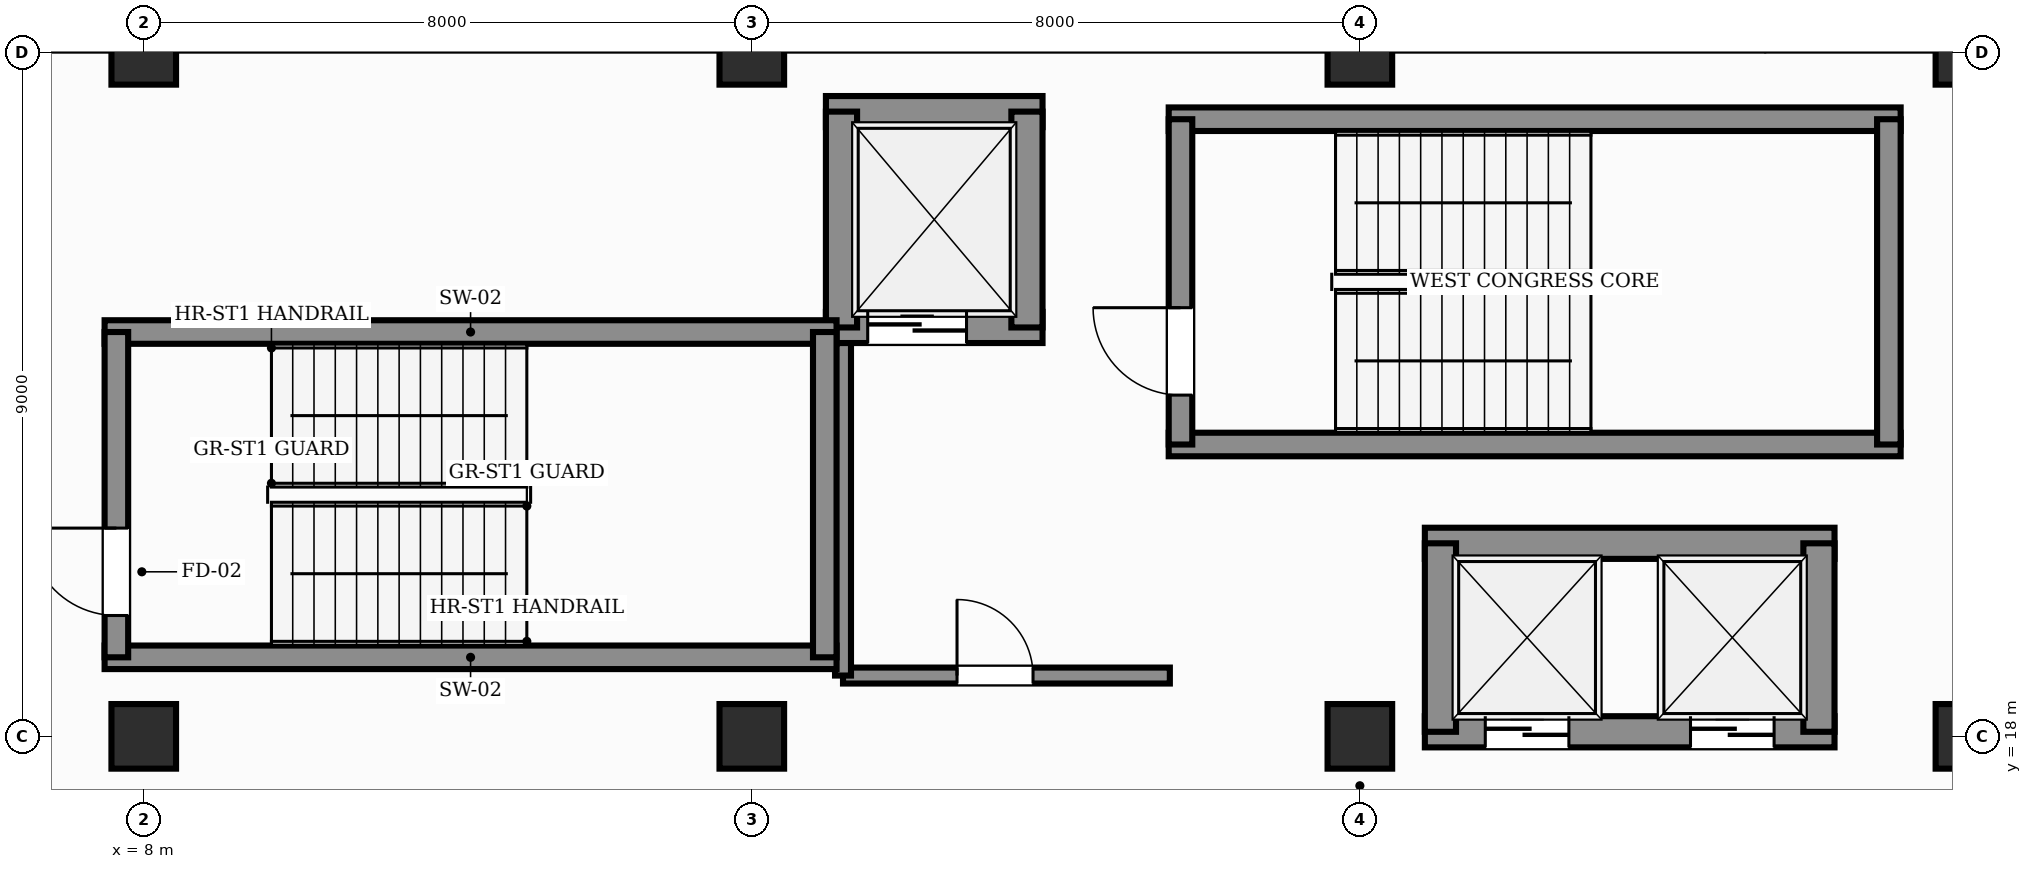
"""IFC4 building model, lengths in metres.
Left out: names, types, materials, properties, quantities, classifications, styles, units other than length and angle.
Written with IfcOpenShell. Run it as: python <this file> out.ifc"""

import sys

from ifc_helpers import new_model, si_unit, direction, frame, frame_2d, origin, origin_2d, place, context, subcontext, project, spatial, rectangle, extrude, element, fill, save


model = new_model("IFC4")
c1 = context("Model", 3, precision=1e-05, world=origin(), true_north=direction((0.0, 1.0)))
c2 = subcontext(c1, "Body", "Model", "MODEL_VIEW")
j1 = project(units=[si_unit("LENGTHUNIT", "METRE"), si_unit("PLANEANGLEUNIT", "RADIAN")], contexts=[c1])
p1 = place(None, origin())
s1 = spatial("IfcSite", under=j1, at=p1, CompositionType="ELEMENT")
p2 = place(p1, origin())
s2 = spatial("IfcBuilding", under=s1, at=p2, CompositionType="ELEMENT")
p3 = place(p2, frame((0.0, 0.0, -4.8)))
s3 = spatial("IfcBuildingStorey", under=s2, at=p3, CompositionType="ELEMENT", Elevation=-4.8)
for number, where, z_axis, x_axis in (
    (1, (8.0, 18.0, 0.0), (0.0, 0.0, 1.0), (1.0, 0.0, 0.0)),
    (2, (8.0, 27.0, 0.0), (0.0, 0.0, 1.0), (1.0, 0.0, 0.0)),
    (3, (16.0, 18.0, 0.0), (0.0, 0.0, 1.0), (1.0, 0.0, 0.0)),
    (4, (16.0, 27.0, 0.0), (0.0, 0.0, 1.0), (1.0, 0.0, 0.0)),
    (5, (24.0, 18.0, 0.0), (0.0, 0.0, 1.0), (1.0, 0.0, 0.0)),
    (6, (24.0, 27.0, 0.0), (0.0, 0.0, 1.0), (1.0, 0.0, 0.0)),
    (7, (32.0, 18.0, 0.0), (0.0, 0.0, 1.0), (1.0, 0.0, 0.0)),
    (8, (32.0, 27.0, 0.0), (0.0, 0.0, 1.0), (1.0, 0.0, 0.0)),
):
    element("IfcColumn", number, at=place(p3, frame(where, z_axis=z_axis, x_axis=x_axis)), inside=s3, PredefinedType="COLUMN", context=c2, shape_type="SweptSolid", body=[
        extrude(rectangle(XDim=0.85, YDim=0.85, at=origin_2d()), origin(), (0.0, 0.0, 1.0), 4.8),
    ])
for number, where, z_axis, x_axis in (
    (9, (21.485, 21.84, 0.0), (0.0, 0.0, 1.0), (1.0, 0.0, 0.0)),
    (10, (21.485, 26.12, 0.0), (0.0, 0.0, 1.0), (1.0, 0.0, 0.0)),
):
    element("IfcWall", number, at=place(p3, frame(where, z_axis=z_axis, x_axis=x_axis)), inside=s3, PredefinedType="SHEAR", context=c2, shape_type="SweptSolid", body=[
        extrude(rectangle(XDim=9.63, YDim=0.31, at=frame_2d((4.815, 0.0))), origin(), (0.0, 0.0, 1.0), 4.8),
    ])
p4 = place(p3, frame((21.64, 21.84, 0.0), z_axis=(0.0, 0.0, 1.0), x_axis=(0.0, 1.0, 0.0)))
e11 = element("IfcWall", 11, at=p4, inside=s3, PredefinedType="SHEAR", context=c2, shape_type="SweptSolid", body=[
    extrude(rectangle(XDim=4.28, YDim=0.31, at=frame_2d((2.14, 0.0))), origin(), (0.0, 0.0, 1.0), 4.8),
])
p5 = place(p4, frame((0.65, 0.0, 0.0)))
e12 = element("IfcOpeningElement", 12, at=p5, cuts=e11, PredefinedType="OPENING", context=c2, shape_type="SweptSolid", body=[
    extrude(rectangle(XDim=1.15, YDim=2.2, at=frame_2d((0.575, 1.1))), frame((0.0, 0.165, 0.0), z_axis=(0.0, -1.0, 0.0), x_axis=(1.0, 0.0, 0.0)), (0.0, 0.0, 1.0), 0.33),
])
p6 = place(p3, frame((30.96, 21.84, 0.0), z_axis=(0.0, 0.0, 1.0), x_axis=(0.0, 1.0, 0.0)))
e13 = element("IfcWall", 13, at=p6, inside=s3, PredefinedType="SHEAR", context=c2, shape_type="SweptSolid", body=[
    extrude(rectangle(XDim=4.28, YDim=0.31, at=frame_2d((2.14, 0.0))), origin(), (0.0, 0.0, 1.0), 4.8),
])
p7 = place(p3, frame((17.2, 18.8, 0.0), z_axis=(0.0, 0.0, 1.0), x_axis=(1.0, 0.0, 0.0)))
e14 = element("IfcWall", 14, at=p7, inside=s3, PredefinedType="PARTITIONING", context=c2, shape_type="SweptSolid", body=[
    extrude(rectangle(XDim=4.3, YDim=0.21, at=frame_2d((2.15, 0.0))), origin(), (0.0, 0.0, 1.0), 3.25),
])
p8 = place(p7, frame((1.5, 0.0, 0.0)))
e15 = element("IfcOpeningElement", 15, at=p8, cuts=e14, PredefinedType="OPENING", context=c2, shape_type="SweptSolid", body=[
    extrude(rectangle(XDim=1.0, YDim=2.15, at=frame_2d((0.5, 1.075))), frame((0.0, 0.115, 0.0), z_axis=(0.0, -1.0, 0.0), x_axis=(1.0, 0.0, 0.0)), (0.0, 0.0, 1.0), 0.23),
])
p9 = place(p3, frame((17.2, 18.8, 0.0), z_axis=(0.0, 0.0, 1.0), x_axis=(0.0, 1.0, 0.0)))
e16 = element("IfcWall", 16, at=p9, inside=s3, PredefinedType="PARTITIONING", context=c2, shape_type="SweptSolid", body=[
    extrude(rectangle(XDim=4.6, YDim=0.21, at=frame_2d((2.3, 0.0))), origin(), (0.0, 0.0, 1.0), 3.25),
])
p10 = place(p3, frame((16.975, 23.38, 0.0), z_axis=(0.0, 0.0, 1.0), x_axis=(1.0, 0.0, 0.0)))
e17 = element("IfcWall", 17, at=p10, inside=s3, PredefinedType="SHEAR", context=c2, shape_type="SweptSolid", body=[
    extrude(rectangle(XDim=2.85, YDim=0.41, at=frame_2d((1.425, 0.0))), origin(), (0.0, 0.0, 1.0), 4.8),
])
p11 = place(p10, frame((0.55, 0.0, 0.0)))
e18 = element("IfcOpeningElement", 18, at=p11, cuts=e17, PredefinedType="OPENING", context=c2, shape_type="SweptSolid", body=[
    extrude(rectangle(XDim=1.3, YDim=2.25, at=frame_2d((0.65, 1.125))), frame((0.0, 0.215, 0.0), z_axis=(0.0, -1.0, 0.0), x_axis=(1.0, 0.0, 0.0)), (0.0, 0.0, 1.0), 0.43),
])
p12 = place(p3, frame((16.975, 26.22, 0.0), z_axis=(0.0, 0.0, 1.0), x_axis=(1.0, 0.0, 0.0)))
e19 = element("IfcWall", 19, at=p12, inside=s3, PredefinedType="SHEAR", context=c2, shape_type="SweptSolid", body=[
    extrude(rectangle(XDim=2.85, YDim=0.41, at=frame_2d((1.425, 0.0))), origin(), (0.0, 0.0, 1.0), 4.8),
])
for number, where, z_axis, x_axis in (
    (20, (17.18, 23.38, 0.0), (0.0, 0.0, 1.0), (0.0, 1.0, 0.0)),
    (21, (19.62, 23.38, 0.0), (0.0, 0.0, 1.0), (0.0, 1.0, 0.0)),
):
    element("IfcWall", number, at=place(p3, frame(where, z_axis=z_axis, x_axis=x_axis)), inside=s3, PredefinedType="SHEAR", context=c2, shape_type="SweptSolid", body=[
        extrude(rectangle(XDim=2.84, YDim=0.41, at=frame_2d((1.42, 0.0))), origin(), (0.0, 0.0, 1.0), 4.8),
    ])
p13 = place(p3, frame((24.855, 18.06, 0.0), z_axis=(0.0, 0.0, 1.0), x_axis=(1.0, 0.0, 0.0)))
e22 = element("IfcWall", 22, at=p13, inside=s3, PredefinedType="SHEAR", context=c2, shape_type="SweptSolid", body=[
    extrude(rectangle(XDim=5.39, YDim=0.41, at=frame_2d((2.695, 0.0))), origin(), (0.0, 0.0, 1.0), 4.8),
])
p14 = place(p13, frame((0.795, 0.0, 0.0)))
e23 = element("IfcOpeningElement", 23, at=p14, cuts=e22, PredefinedType="OPENING", context=c2, shape_type="SweptSolid", body=[
    extrude(rectangle(XDim=1.1, YDim=2.2, at=frame_2d((0.55, 1.1))), frame((0.0, 0.215, 0.0), z_axis=(0.0, -1.0, 0.0), x_axis=(1.0, 0.0, 0.0)), (0.0, 0.0, 1.0), 0.43),
])
p15 = place(p13, frame((3.495, 0.0, 0.0)))
e24 = element("IfcOpeningElement", 24, at=p15, cuts=e22, PredefinedType="OPENING", context=c2, shape_type="SweptSolid", body=[
    extrude(rectangle(XDim=1.1, YDim=2.2, at=frame_2d((0.55, 1.1))), frame((0.0, 0.215, 0.0), z_axis=(0.0, -1.0, 0.0), x_axis=(1.0, 0.0, 0.0)), (0.0, 0.0, 1.0), 0.43),
])
p16 = place(p3, frame((24.855, 20.54, 0.0), z_axis=(0.0, 0.0, 1.0), x_axis=(1.0, 0.0, 0.0)))
e25 = element("IfcWall", 25, at=p16, inside=s3, PredefinedType="SHEAR", context=c2, shape_type="SweptSolid", body=[
    extrude(rectangle(XDim=5.39, YDim=0.41, at=frame_2d((2.695, 0.0))), origin(), (0.0, 0.0, 1.0), 4.8),
])
for number, where, z_axis, x_axis in (
    (26, (25.06, 18.06, 0.0), (0.0, 0.0, 1.0), (0.0, 1.0, 0.0)),
    (27, (30.04, 18.06, 0.0), (0.0, 0.0, 1.0), (0.0, 1.0, 0.0)),
):
    element("IfcWall", number, at=place(p3, frame(where, z_axis=z_axis, x_axis=x_axis)), inside=s3, PredefinedType="SHEAR", context=c2, shape_type="SweptSolid", body=[
        extrude(rectangle(XDim=2.48, YDim=0.41, at=frame_2d((1.24, 0.0))), origin(), (0.0, 0.0, 1.0), 4.8),
    ])
for number, where, z_axis, x_axis in (
    (28, (7.485, 19.04, 0.0), (0.0, 0.0, 1.0), (1.0, 0.0, 0.0)),
    (29, (7.485, 23.32, 0.0), (0.0, 0.0, 1.0), (1.0, 0.0, 0.0)),
):
    element("IfcWall", number, at=place(p3, frame(where, z_axis=z_axis, x_axis=x_axis)), inside=s3, PredefinedType="SHEAR", context=c2, shape_type="SweptSolid", body=[
        extrude(rectangle(XDim=9.63, YDim=0.31, at=frame_2d((4.815, 0.0))), origin(), (0.0, 0.0, 1.0), 4.8),
    ])
p17 = place(p3, frame((7.64, 19.04, 0.0), z_axis=(0.0, 0.0, 1.0), x_axis=(0.0, 1.0, 0.0)))
e30 = element("IfcWall", 30, at=p17, inside=s3, PredefinedType="SHEAR", context=c2, shape_type="SweptSolid", body=[
    extrude(rectangle(XDim=4.28, YDim=0.31, at=frame_2d((2.14, 0.0))), origin(), (0.0, 0.0, 1.0), 4.8),
])
p18 = place(p17, frame((0.55, 0.0, 0.0)))
e31 = element("IfcOpeningElement", 31, at=p18, cuts=e30, PredefinedType="OPENING", context=c2, shape_type="SweptSolid", body=[
    extrude(rectangle(XDim=1.15, YDim=2.2, at=frame_2d((0.575, 1.1))), frame((0.0, 0.165, 0.0), z_axis=(0.0, -1.0, 0.0), x_axis=(1.0, 0.0, 0.0)), (0.0, 0.0, 1.0), 0.33),
])
p19 = place(p3, frame((16.96, 19.04, 0.0), z_axis=(0.0, 0.0, 1.0), x_axis=(0.0, 1.0, 0.0)))
e32 = element("IfcWall", 32, at=p19, inside=s3, PredefinedType="SHEAR", context=c2, shape_type="SweptSolid", body=[
    extrude(rectangle(XDim=4.28, YDim=0.31, at=frame_2d((2.14, 0.0))), origin(), (0.0, 0.0, 1.0), 4.8),
])
p20 = place(p5, origin())
e33 = element("IfcDoor", 33, at=p20, inside=s3, OperationType="SINGLE_SWING_RIGHT", PredefinedType="DOOR", context=c2, shape_type="SweptSolid", body=[
    extrude(rectangle(XDim=1.15, YDim=2.2, at=frame_2d((0.575, 1.1))), frame((0.0, 0.025, 0.0), z_axis=(0.0, -1.0, 0.0), x_axis=(1.0, 0.0, 0.0)), (0.0, 0.0, 1.0), 0.05),
])
fill(e12, e33)
p21 = place(p8, origin())
e34 = element("IfcDoor", 34, at=p21, inside=s3, OperationType="SINGLE_SWING_LEFT", PredefinedType="DOOR", context=c2, shape_type="SweptSolid", body=[
    extrude(rectangle(XDim=1.0, YDim=2.15, at=frame_2d((0.5, 1.075))), frame((0.0, 0.025, 0.0), z_axis=(0.0, -1.0, 0.0), x_axis=(1.0, 0.0, 0.0)), (0.0, 0.0, 1.0), 0.05),
])
fill(e15, e34)
p22 = place(p11, origin())
e35 = element("IfcDoor", 35, at=p22, inside=s3, OperationType="DOUBLE_DOOR_SLIDING", PredefinedType="DOOR", context=c2, shape_type="SweptSolid", body=[
    extrude(rectangle(XDim=1.3, YDim=2.25, at=frame_2d((0.65, 1.125))), frame((0.0, 0.025, 0.0), z_axis=(0.0, -1.0, 0.0), x_axis=(1.0, 0.0, 0.0)), (0.0, 0.0, 1.0), 0.05),
])
fill(e18, e35)
p23 = place(p14, origin())
e36 = element("IfcDoor", 36, at=p23, inside=s3, OperationType="DOUBLE_DOOR_SLIDING", PredefinedType="DOOR", context=c2, shape_type="SweptSolid", body=[
    extrude(rectangle(XDim=1.1, YDim=2.2, at=frame_2d((0.55, 1.1))), frame((0.0, 0.025, 0.0), z_axis=(0.0, -1.0, 0.0), x_axis=(1.0, 0.0, 0.0)), (0.0, 0.0, 1.0), 0.05),
])
fill(e23, e36)
p24 = place(p15, origin())
e37 = element("IfcDoor", 37, at=p24, inside=s3, OperationType="DOUBLE_DOOR_SLIDING", PredefinedType="DOOR", context=c2, shape_type="SweptSolid", body=[
    extrude(rectangle(XDim=1.1, YDim=2.2, at=frame_2d((0.55, 1.1))), frame((0.0, 0.025, 0.0), z_axis=(0.0, -1.0, 0.0), x_axis=(1.0, 0.0, 0.0)), (0.0, 0.0, 1.0), 0.05),
])
fill(e24, e37)
p25 = place(p18, origin())
e38 = element("IfcDoor", 38, at=p25, inside=s3, OperationType="SINGLE_SWING_RIGHT", PredefinedType="DOOR", context=c2, shape_type="SweptSolid", body=[
    extrude(rectangle(XDim=1.15, YDim=2.2, at=frame_2d((0.575, 1.1))), frame((0.0, 0.025, 0.0), z_axis=(0.0, -1.0, 0.0), x_axis=(1.0, 0.0, 0.0)), (0.0, 0.0, 1.0), 0.05),
])
fill(e31, e38)
save(model, sys.argv[1])
